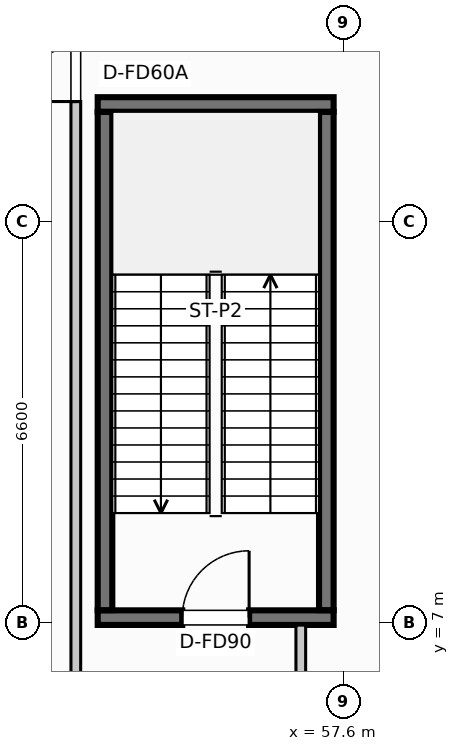
"""IFC4 building model, lengths in metres.
Left out: names, types, materials, properties, quantities, classifications, styles, units other than length and angle.
Written with IfcOpenShell. Run it as: python <this file> out.ifc"""

import sys

from ifc_helpers import new_model, si_unit, direction, frame, frame_2d, origin, place, context, subcontext, project, spatial, rectangle, extrude, element, fill, save


model = new_model("IFC4")
c1 = context("Model", 3, precision=1e-05, world=origin(), true_north=direction((0.0, 1.0)))
c2 = subcontext(c1, "Body", "Model", "MODEL_VIEW")
j1 = project(units=[si_unit("LENGTHUNIT", "METRE"), si_unit("PLANEANGLEUNIT", "RADIAN")], contexts=[c1])
p1 = place(None, origin())
s1 = spatial("IfcSite", under=j1, at=p1, CompositionType="ELEMENT")
p2 = place(p1, origin())
s2 = spatial("IfcBuilding", under=s1, at=p2, CompositionType="ELEMENT")
p3 = place(p2, frame((0.0, 0.0, -5.4)))
s3 = spatial("IfcBuildingStorey", under=s2, at=p3, CompositionType="ELEMENT", Elevation=-5.4)
p4 = place(p3, frame((53.56, 7.08, 0.0), z_axis=(0.0, 0.0, 1.0), x_axis=(1.0, 0.0, 0.0)))
e1 = element("IfcWall", 1, at=p4, inside=s3, PredefinedType="SHEAR", context=c2, shape_type="SweptSolid", body=[
    extrude(rectangle(XDim=3.88, YDim=0.24, at=frame_2d((1.94, 0.0))), origin(), (0.0, 0.0, 1.0), 5.4),
])
p5 = place(p4, frame((1.39, 0.0, 0.0)))
e2 = element("IfcOpeningElement", 2, at=p5, cuts=e1, PredefinedType="OPENING", context=c2, shape_type="SweptSolid", body=[
    extrude(rectangle(XDim=1.1, YDim=2.0, at=frame_2d((0.55, 1.0))), frame((0.0, 0.13, 0.0), z_axis=(0.0, -1.0, 0.0), x_axis=(1.0, 0.0, 0.0)), (0.0, 0.0, 1.0), 0.26),
])
p6 = place(p3, frame((57.44, 15.52, 0.0), z_axis=(0.0, 0.0, 1.0), x_axis=(-1.0, 0.0, 0.0)))
e3 = element("IfcWall", 3, at=p6, inside=s3, PredefinedType="SHEAR", context=c2, shape_type="SweptSolid", body=[
    extrude(rectangle(XDim=3.88, YDim=0.24, at=frame_2d((1.94, 0.0))), origin(), (0.0, 0.0, 1.0), 5.4),
])
for number, where, z_axis, x_axis in (
    (4, (53.68, 7.203, 0.0), (0.0, 0.0, 1.0), (0.0, 1.0, 0.0)),
    (5, (57.32, 7.203, 0.0), (0.0, 0.0, 1.0), (0.0, 1.0, 0.0)),
):
    element("IfcWall", number, at=place(p3, frame(where, z_axis=z_axis, x_axis=x_axis)), inside=s3, PredefinedType="SHEAR", context=c2, shape_type="SweptSolid", body=[
        extrude(rectangle(XDim=8.194, YDim=0.24, at=frame_2d((4.097, 0.0))), origin(), (0.0, 0.0, 1.0), 5.4),
    ])
p7 = place(p3, frame((53.2, 4.5, 0.0), z_axis=(0.0, 0.0, 1.0), x_axis=(0.0, 1.0, 0.0)))
e6 = element("IfcWall", 6, at=p7, inside=s3, PredefinedType="PARTITIONING", context=c2, shape_type="SweptSolid", body=[
    extrude(rectangle(XDim=33.5, YDim=0.16, at=frame_2d((16.75, 0.0))), origin(), (0.0, 0.0, 1.0), 5.085),
])
p8 = place(p7, frame((11.069, 0.0, 0.0)))
e7 = element("IfcOpeningElement", 7, at=p8, cuts=e6, PredefinedType="OPENING", context=c2, shape_type="SweptSolid", body=[
    extrude(rectangle(XDim=0.9, YDim=2.0, at=frame_2d((0.45, 1.0))), frame((0.0, 0.09, 0.0), z_axis=(0.0, -1.0, 0.0), x_axis=(1.0, 0.0, 0.0)), (0.0, 0.0, 1.0), 0.18),
])
p9 = place(p3, frame((56.9, 4.583, 0.0), z_axis=(0.0, 0.0, 1.0), x_axis=(0.0, 1.0, 0.0)))
e8 = element("IfcWall", 8, at=p9, inside=s3, PredefinedType="PARTITIONING", context=c2, shape_type="SweptSolid", body=[
    extrude(rectangle(XDim=2.374, YDim=0.16, at=frame_2d((1.187, 0.0))), origin(), (0.0, 0.0, 1.0), 5.085),
])
p10 = place(p5, origin())
e9 = element("IfcDoor", 9, at=p10, inside=s3, OperationType="SINGLE_SWING_RIGHT", PredefinedType="DOOR", context=c2, shape_type="SweptSolid", body=[
    extrude(rectangle(XDim=1.1, YDim=2.0, at=frame_2d((0.55, 1.0))), frame((0.0, 0.025, 0.0), z_axis=(0.0, -1.0, 0.0), x_axis=(1.0, 0.0, 0.0)), (0.0, 0.0, 1.0), 0.05),
])
fill(e2, e9)
p11 = place(p8, origin())
e10 = element("IfcDoor", 10, at=p11, inside=s3, OperationType="SINGLE_SWING_LEFT", PredefinedType="DOOR", context=c2, shape_type="SweptSolid", body=[
    extrude(rectangle(XDim=0.9, YDim=2.0, at=frame_2d((0.45, 1.0))), frame((0.0, 0.025, 0.0), z_axis=(0.0, -1.0, 0.0), x_axis=(1.0, 0.0, 0.0)), (0.0, 0.0, 1.0), 0.05),
])
fill(e7, e10)
save(model, sys.argv[1])
